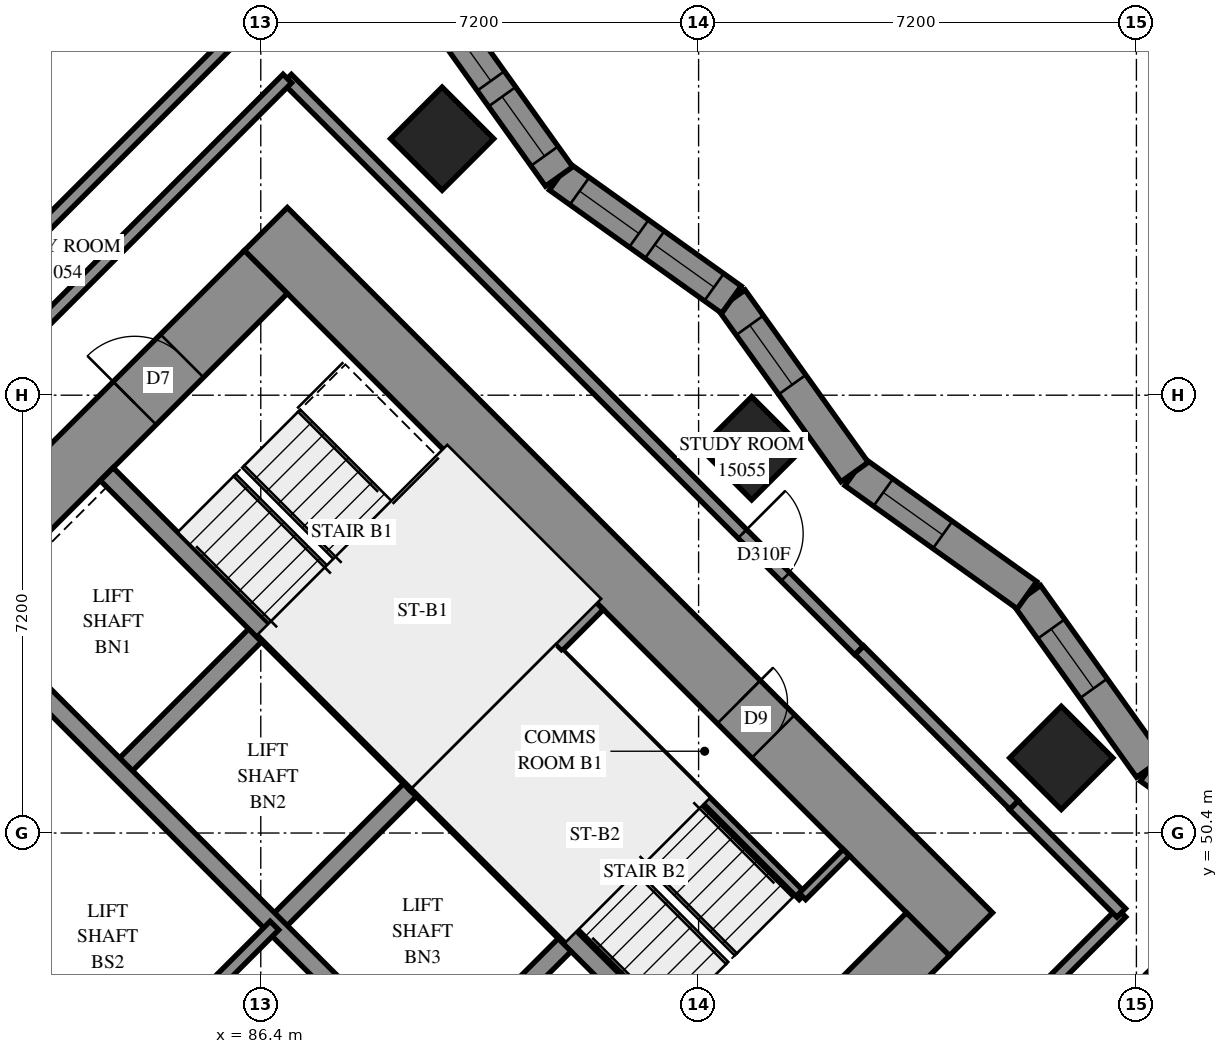
"""IFC4 building model, lengths in metres.
Left out: names, types, materials, properties, quantities, classifications, styles, units other than length and angle.
Written with IfcOpenShell. Run it as: python <this file> out.ifc"""

import sys

from ifc_helpers import new_model, si_unit, direction, frame, frame_2d, origin, origin_2d, place, context, subcontext, project, spatial, polyline, rectangle, outline, extrude, element, fill, save


model = new_model("IFC4")
c1 = context("Model", 3, precision=1e-05, world=origin(), true_north=direction((0.0, 1.0)))
c2 = subcontext(c1, "Body", "Model", "MODEL_VIEW")
j1 = project(units=[si_unit("LENGTHUNIT", "METRE"), si_unit("PLANEANGLEUNIT", "RADIAN")], contexts=[c1])
p1 = place(None, origin())
s1 = spatial("IfcSite", under=j1, at=p1, CompositionType="ELEMENT")
p2 = place(p1, origin())
s2 = spatial("IfcBuilding", under=s1, at=p2, CompositionType="ELEMENT")
p3 = place(p2, frame((0.0, 0.0, 57.6)))
s3 = spatial("IfcBuildingStorey", under=s2, at=p3, CompositionType="ELEMENT", Elevation=57.6)
for number, where, z_axis, x_axis in (
    (1, (89.382, 61.818, 0.0), (0.0, 0.0, 1.0), (0.707, -0.707, 0.0)),
    (2, (94.474, 56.727, 0.0), (0.0, 0.0, 1.0), (0.707, -0.707, 0.0)),
    (3, (99.565, 51.635, 0.0), (0.0, 0.0, 1.0), (0.707, -0.707, 0.0)),
):
    element("IfcColumn", number, at=place(p3, frame(where, z_axis=z_axis, x_axis=x_axis)), inside=s3, PredefinedType="COLUMN", context=c2, shape_type="SweptSolid", body=[
        extrude(rectangle(XDim=1.2, YDim=1.2, at=origin_2d()), origin(), (0.0, 0.0, 1.0), 3.1),
    ])
p4 = place(p3, frame((75.594, 49.443, -0.3), z_axis=(0.0, 0.0, 1.0), x_axis=(0.7071037324, -0.70710983, 0.0)))
e4 = element("IfcWall", 4, at=p4, inside=s3, PredefinedType="SHEAR", context=c2, shape_type="SweptSolid", body=[
    extrude(rectangle(XDim=16.4, YDim=1.0, at=frame_2d((8.2, 0.0))), origin(), (0.0, 0.0, 1.0), 2.7),
])
p5 = place(p3, frame((86.483, 60.333, -0.3), z_axis=(0.0, 0.0, 1.0), x_axis=(0.70710983, -0.7071037324, 0.0)))
e5 = element("IfcWall", 5, at=p5, inside=s3, PredefinedType="SHEAR", context=c2, shape_type="SweptSolid", body=[
    extrude(rectangle(XDim=16.4, YDim=1.0, at=frame_2d((8.2, 0.0))), origin(), (0.0, 0.0, 1.0), 2.7),
])
p6 = place(p5, frame((11.0, 0.0, 0.3)))
e6 = element("IfcOpeningElement", 6, at=p6, cuts=e5, PredefinedType="OPENING", context=c2, shape_type="SweptSolid", body=[
    extrude(rectangle(XDim=0.8, YDim=2.1, at=frame_2d((0.4, 1.05))), frame((0.0, 0.51, 0.0), z_axis=(0.0, -1.0, 0.0), x_axis=(1.0, 0.0, 0.0)), (0.0, 0.0, 1.0), 1.02),
])
p7 = place(p3, frame((76.301, 49.443, -0.3), z_axis=(0.0, 0.0, 1.0), x_axis=(0.7071067812, 0.7071067812, 0.0)))
e7 = element("IfcWall", 7, at=p7, inside=s3, PredefinedType="SHEAR", context=c2, shape_type="SweptSolid", body=[
    extrude(rectangle(XDim=14.4, YDim=1.0, at=frame_2d((7.2, 0.0))), origin(), (0.0, 0.0, 1.0), 2.7),
])
p8 = place(p7, frame((4.55, 0.0, 0.3)))
e8 = element("IfcOpeningElement", 8, at=p8, cuts=e7, PredefinedType="OPENING", context=c2, shape_type="SweptSolid", body=[
    extrude(rectangle(XDim=1.1, YDim=2.1, at=frame_2d((0.55, 1.05))), frame((0.0, 0.51, 0.0), z_axis=(0.0, -1.0, 0.0), x_axis=(1.0, 0.0, 0.0)), (0.0, 0.0, 1.0), 1.02),
])
p9 = place(p7, frame((11.35, 0.0, 0.3)))
e9 = element("IfcOpeningElement", 9, at=p9, cuts=e7, PredefinedType="OPENING", context=c2, shape_type="SweptSolid", body=[
    extrude(rectangle(XDim=1.1, YDim=2.1, at=frame_2d((0.55, 1.05))), frame((0.0, 0.51, 0.0), z_axis=(0.0, -1.0, 0.0), x_axis=(1.0, 0.0, 0.0)), (0.0, 0.0, 1.0), 1.02),
])
p10 = place(p3, frame((87.19, 38.554, -0.3), z_axis=(0.0, 0.0, 1.0), x_axis=(0.707103309, 0.7071102534, 0.0)))
e10 = element("IfcWall", 10, at=p10, inside=s3, PredefinedType="SHEAR", context=c2, shape_type="SweptSolid", body=[
    extrude(rectangle(XDim=14.4, YDim=1.0, at=frame_2d((7.2, 0.0))), origin(), (0.0, 0.0, 1.0), 2.7),
])
p11 = place(p10, frame((4.55, 0.0, 0.3)))
e11 = element("IfcOpeningElement", 11, at=p11, cuts=e10, PredefinedType="OPENING", context=c2, shape_type="SweptSolid", body=[
    extrude(rectangle(XDim=1.1, YDim=2.1, at=frame_2d((0.55, 1.05))), frame((0.0, 0.51, 0.0), z_axis=(0.0, -1.0, 0.0), x_axis=(1.0, 0.0, 0.0)), (0.0, 0.0, 1.0), 1.02),
])
p12 = place(p10, frame((11.35, 0.0, 0.3)))
e12 = element("IfcOpeningElement", 12, at=p12, cuts=e10, PredefinedType="OPENING", context=c2, shape_type="SweptSolid", body=[
    extrude(rectangle(XDim=1.1, YDim=2.1, at=frame_2d((0.55, 1.05))), frame((0.0, 0.51, 0.0), z_axis=(0.0, -1.0, 0.0), x_axis=(1.0, 0.0, 0.0)), (0.0, 0.0, 1.0), 1.02),
])
p13 = place(p3, frame((84.079, 51.423, 0.0), z_axis=(0.0, 0.0, 1.0), x_axis=(0.7071219326, 0.7070916295, 0.0)))
e13 = element("IfcWall", 13, at=p13, inside=s3, PredefinedType="SOLIDWALL", context=c2, shape_type="SweptSolid", body=[
    extrude(rectangle(XDim=3.3, YDim=0.3, at=frame_2d((1.65, 0.0))), origin(), (0.0, 0.0, 1.0), 3.1),
])
for number, where, z_axis, x_axis in (
    (14, (86.625, 48.878, 0.0), (0.0, 0.0, 1.0), (0.707, 0.707, 0.0)),
    (15, (89.17, 46.332, 0.0), (0.0, 0.0, 1.0), (0.707, 0.707, 0.0)),
):
    element("IfcWall", number, at=place(p3, frame(where, z_axis=z_axis, x_axis=x_axis)), inside=s3, PredefinedType="SOLIDWALL", context=c2, shape_type="SweptSolid", body=[
        extrude(rectangle(XDim=3.3, YDim=0.3, at=frame_2d((1.65, 0.0))), origin(), (0.0, 0.0, 1.0), 3.1),
    ])
p14 = place(p3, frame((78.988, 51.423, 0.0), z_axis=(0.0, 0.0, 1.0), x_axis=(0.7071067812, -0.7071067812, 0.0)))
e16 = element("IfcWall", 16, at=p14, inside=s3, PredefinedType="SOLIDWALL", context=c2, shape_type="SweptSolid", body=[
    extrude(rectangle(XDim=14.4, YDim=0.3, at=frame_2d((7.2, 0.0))), origin(), (0.0, 0.0, 1.0), 3.1),
])
p15 = place(p14, frame((1.25, 0.0, 0.0)))
e17 = element("IfcOpeningElement", 17, at=p15, cuts=e16, PredefinedType="OPENING", context=c2, shape_type="SweptSolid", body=[
    extrude(rectangle(XDim=1.1, YDim=2.1, at=frame_2d((0.55, 1.05))), frame((0.0, 0.16, 0.0), z_axis=(0.0, -1.0, 0.0), x_axis=(1.0, 0.0, 0.0)), (0.0, 0.0, 1.0), 0.32),
])
p16 = place(p14, frame((4.85, 0.0, 0.0)))
e18 = element("IfcOpeningElement", 18, at=p16, cuts=e16, PredefinedType="OPENING", context=c2, shape_type="SweptSolid", body=[
    extrude(rectangle(XDim=1.1, YDim=2.1, at=frame_2d((0.55, 1.05))), frame((0.0, 0.16, 0.0), z_axis=(0.0, -1.0, 0.0), x_axis=(1.0, 0.0, 0.0)), (0.0, 0.0, 1.0), 0.32),
])
p17 = place(p14, frame((8.45, 0.0, 0.0)))
e19 = element("IfcOpeningElement", 19, at=p17, cuts=e16, PredefinedType="OPENING", context=c2, shape_type="SweptSolid", body=[
    extrude(rectangle(XDim=1.1, YDim=2.1, at=frame_2d((0.55, 1.05))), frame((0.0, 0.16, 0.0), z_axis=(0.0, -1.0, 0.0), x_axis=(1.0, 0.0, 0.0)), (0.0, 0.0, 1.0), 0.32),
])
p18 = place(p14, frame((12.05, 0.0, 0.0)))
e20 = element("IfcOpeningElement", 20, at=p18, cuts=e16, PredefinedType="OPENING", context=c2, shape_type="SweptSolid", body=[
    extrude(rectangle(XDim=1.1, YDim=2.1, at=frame_2d((0.55, 1.05))), frame((0.0, 0.16, 0.0), z_axis=(0.0, -1.0, 0.0), x_axis=(1.0, 0.0, 0.0)), (0.0, 0.0, 1.0), 0.32),
])
p19 = place(p3, frame((81.534, 53.969, 0.0), z_axis=(0.0, 0.0, 1.0), x_axis=(0.707103309, -0.7071102534, 0.0)))
e21 = element("IfcWall", 21, at=p19, inside=s3, PredefinedType="SOLIDWALL", context=c2, shape_type="SweptSolid", body=[
    extrude(rectangle(XDim=14.4, YDim=0.3, at=frame_2d((7.2, 0.0))), origin(), (0.0, 0.0, 1.0), 3.1),
])
p20 = place(p19, frame((12.05, 0.0, 0.0)))
e22 = element("IfcOpeningElement", 22, at=p20, cuts=e21, PredefinedType="OPENING", context=c2, shape_type="SweptSolid", body=[
    extrude(rectangle(XDim=1.1, YDim=2.1, at=frame_2d((0.55, 1.05))), frame((0.0, 0.16, 0.0), z_axis=(0.0, -1.0, 0.0), x_axis=(1.0, 0.0, 0.0)), (0.0, 0.0, 1.0), 0.32),
])
for number, where, z_axis, x_axis in (
    (23, (83.867, 56.302, 0.0), (0.0, 0.0, 1.0), (0.707, -0.707, 0.0)),
    (24, (88.958, 51.211, 0.0), (0.0, 0.0, 1.0), (0.707, -0.707, 0.0)),
):
    element("IfcWall", number, at=place(p3, frame(where, z_axis=z_axis, x_axis=x_axis)), inside=s3, PredefinedType="SOLIDWALL", context=c2, shape_type="SweptSolid", body=[
        extrude(rectangle(XDim=7.2, YDim=0.3, at=frame_2d((3.6, 0.0))), origin(), (0.0, 0.0, 1.0), 3.1),
    ])
p21 = place(p3, frame((88.958, 51.211, 0.0), z_axis=(0.0, 0.0, 1.0), x_axis=(0.7071067812, 0.7071067812, 0.0)))
e25 = element("IfcWall", 25, at=p21, inside=s3, PredefinedType="SOLIDWALL", context=c2, shape_type="SweptSolid", body=[
    extrude(rectangle(XDim=4.2, YDim=0.3, at=frame_2d((2.1, 0.0))), origin(), (0.0, 0.0, 1.0), 3.1),
])
p22 = place(p3, frame((103.86, 49.452, 0.0), z_axis=(0.0, 0.0, 1.0), x_axis=(-0.8136209625, 0.5813956737, 0.0)))
e26 = element("IfcWall", 26, at=p22, inside=s3, PredefinedType="SOLIDWALL", context=c2, shape_type="SweptSolid", body=[
    extrude(outline(polyline([(-0.046, -0.275), (3.438, -0.275), (3.53, 0.275), (0.046, 0.275), (-0.046, -0.275)])), origin(), (0.0, 0.0, 1.0), 3.1),
])
p23 = place(p22, frame((1.539, 0.0, 0.5)))
e27 = element("IfcOpeningElement", 27, at=p23, cuts=e26, PredefinedType="OPENING", context=c2, shape_type="SweptSolid", body=[
    extrude(rectangle(XDim=1.2, YDim=2.45, at=frame_2d((0.6, 1.225))), frame((0.0, 0.285, 0.0), z_axis=(0.0, -1.0, 0.0), x_axis=(1.0, 0.0, 0.0)), (0.0, 0.0, 1.0), 0.57),
])
p24 = place(p3, frame((101.026, 51.477, 0.0), z_axis=(0.0, 0.0, 1.0), x_axis=(-0.5813956737, 0.8136209625, 0.0)))
e28 = element("IfcWall", 28, at=p24, inside=s3, PredefinedType="SOLIDWALL", context=c2, shape_type="SweptSolid", body=[
    extrude(outline(polyline([(0.046, -0.275), (3.53, -0.275), (3.438, 0.275), (-0.046, 0.275), (0.046, -0.275)])), origin(), (0.0, 0.0, 1.0), 3.1),
])
p25 = place(p24, frame((1.599, 0.0, 0.5)))
e29 = element("IfcOpeningElement", 29, at=p25, cuts=e28, PredefinedType="OPENING", context=c2, shape_type="SweptSolid", body=[
    extrude(rectangle(XDim=1.2, YDim=2.45, at=frame_2d((0.6, 1.225))), frame((0.0, 0.285, 0.0), z_axis=(0.0, -1.0, 0.0), x_axis=(1.0, 0.0, 0.0)), (0.0, 0.0, 1.0), 0.57),
])
p26 = place(p3, frame((99.0, 54.311, 0.0), z_axis=(0.0, 0.0, 1.0), x_axis=(-0.8136209625, 0.5813956737, 0.0)))
e30 = element("IfcWall", 30, at=p26, inside=s3, PredefinedType="SOLIDWALL", context=c2, shape_type="SweptSolid", body=[
    extrude(outline(polyline([(-0.046, -0.275), (3.438, -0.275), (3.53, 0.275), (0.046, 0.275), (-0.046, -0.275)])), origin(), (0.0, 0.0, 1.0), 3.1),
])
p27 = place(p26, frame((1.705, 0.0, 0.5)))
e31 = element("IfcOpeningElement", 31, at=p27, cuts=e30, PredefinedType="OPENING", context=c2, shape_type="SweptSolid", body=[
    extrude(rectangle(XDim=1.2, YDim=2.45, at=frame_2d((0.6, 1.225))), frame((0.0, 0.285, 0.0), z_axis=(0.0, -1.0, 0.0), x_axis=(1.0, 0.0, 0.0)), (0.0, 0.0, 1.0), 0.57),
])
p28 = place(p3, frame((96.166, 56.337, 0.0), z_axis=(0.0, 0.0, 1.0), x_axis=(-0.5813956737, 0.8136209625, 0.0)))
e32 = element("IfcWall", 32, at=p28, inside=s3, PredefinedType="SOLIDWALL", context=c2, shape_type="SweptSolid", body=[
    extrude(outline(polyline([(0.046, -0.275), (3.53, -0.275), (3.438, 0.275), (-0.046, 0.275), (0.046, -0.275)])), origin(), (0.0, 0.0, 1.0), 3.1),
])
p29 = place(p28, frame((1.765, 0.0, 0.5)))
e33 = element("IfcOpeningElement", 33, at=p29, cuts=e32, PredefinedType="OPENING", context=c2, shape_type="SweptSolid", body=[
    extrude(rectangle(XDim=1.2, YDim=2.45, at=frame_2d((0.6, 1.225))), frame((0.0, 0.285, 0.0), z_axis=(0.0, -1.0, 0.0), x_axis=(1.0, 0.0, 0.0)), (0.0, 0.0, 1.0), 0.57),
])
p30 = place(p3, frame((94.141, 59.171, 0.0), z_axis=(0.0, 0.0, 1.0), x_axis=(-0.8136209625, 0.5813956737, 0.0)))
e34 = element("IfcWall", 34, at=p30, inside=s3, PredefinedType="SOLIDWALL", context=c2, shape_type="SweptSolid", body=[
    extrude(outline(polyline([(-0.046, -0.275), (3.438, -0.275), (3.53, 0.275), (0.046, 0.275), (-0.046, -0.275)])), origin(), (0.0, 0.0, 1.0), 3.1),
])
p31 = place(p30, frame((0.352, 0.0, 0.5)))
e35 = element("IfcOpeningElement", 35, at=p31, cuts=e34, PredefinedType="OPENING", context=c2, shape_type="SweptSolid", body=[
    extrude(rectangle(XDim=1.2, YDim=2.45, at=frame_2d((0.6, 1.225))), frame((0.0, 0.285, 0.0), z_axis=(0.0, -1.0, 0.0), x_axis=(1.0, 0.0, 0.0)), (0.0, 0.0, 1.0), 0.57),
])
p32 = place(p30, frame((1.871, 0.0, 0.5)))
e36 = element("IfcOpeningElement", 36, at=p32, cuts=e34, PredefinedType="OPENING", context=c2, shape_type="SweptSolid", body=[
    extrude(rectangle(XDim=1.2, YDim=2.45, at=frame_2d((0.6, 1.225))), frame((0.0, 0.285, 0.0), z_axis=(0.0, -1.0, 0.0), x_axis=(1.0, 0.0, 0.0)), (0.0, 0.0, 1.0), 0.57),
])
p33 = place(p3, frame((91.306, 61.197, 0.0), z_axis=(0.0, 0.0, 1.0), x_axis=(-0.5813956737, 0.8136209625, 0.0)))
e37 = element("IfcWall", 37, at=p33, inside=s3, PredefinedType="SOLIDWALL", context=c2, shape_type="SweptSolid", body=[
    extrude(outline(polyline([(0.046, -0.275), (3.53, -0.275), (3.438, 0.275), (-0.046, 0.275), (0.046, -0.275)])), origin(), (0.0, 0.0, 1.0), 3.1),
])
p34 = place(p33, frame((0.412, 0.0, 0.5)))
e38 = element("IfcOpeningElement", 38, at=p34, cuts=e37, PredefinedType="OPENING", context=c2, shape_type="SweptSolid", body=[
    extrude(rectangle(XDim=1.2, YDim=2.45, at=frame_2d((0.6, 1.225))), frame((0.0, 0.285, 0.0), z_axis=(0.0, -1.0, 0.0), x_axis=(1.0, 0.0, 0.0)), (0.0, 0.0, 1.0), 0.57),
])
p35 = place(p33, frame((1.931, 0.0, 0.5)))
e39 = element("IfcOpeningElement", 39, at=p35, cuts=e37, PredefinedType="OPENING", context=c2, shape_type="SweptSolid", body=[
    extrude(rectangle(XDim=1.2, YDim=2.45, at=frame_2d((0.6, 1.225))), frame((0.0, 0.285, 0.0), z_axis=(0.0, -1.0, 0.0), x_axis=(1.0, 0.0, 0.0)), (0.0, 0.0, 1.0), 0.57),
])
p36 = place(p3, frame((91.313, 53.354, 0.0), z_axis=(0.0, 0.0, 1.0), x_axis=(0.7071067812, -0.7071067812, 0.0)))
e40 = element("IfcWall", 40, at=p36, inside=s3, PredefinedType="PARTITIONING", context=c2, shape_type="SweptSolid", body=[
    extrude(rectangle(XDim=5.65, YDim=0.15, at=frame_2d((2.825, 0.0))), origin(), (0.0, 0.0, 1.0), 3.1),
])
p37 = place(p3, frame((95.308, 49.358, 0.0), z_axis=(0.0, 0.0, 1.0), x_axis=(0.70705776, 0.707155799, 0.0)))
e41 = element("IfcWall", 41, at=p37, inside=s3, PredefinedType="PARTITIONING", context=c2, shape_type="SweptSolid", body=[
    extrude(rectangle(XDim=1.02, YDim=0.15, at=frame_2d((0.51, 0.0))), origin(), (0.0, 0.0, 1.0), 3.1),
])
p38 = place(p3, frame((84.079, 46.332, 0.0), z_axis=(0.0, 0.0, 1.0), x_axis=(0.7071067812, 0.7071067812, 0.0)))
e42 = element("IfcWall", 42, at=p38, inside=s3, PredefinedType="PARTITIONING", context=c2, shape_type="SweptSolid", body=[
    extrude(rectangle(XDim=3.6, YDim=0.2, at=frame_2d((1.8, 0.0))), origin(), (0.0, 0.0, 1.0), 3.1),
])
p39 = place(p3, frame((86.833, 62.805, 0.0), z_axis=(0.0, 0.0, 1.0), x_axis=(0.7072045138, -0.7070090351, 0.0)))
e43 = element("IfcWall", 43, at=p39, inside=s3, PredefinedType="PARTITIONING", context=c2, shape_type="SweptSolid", body=[
    extrude(rectangle(XDim=13.301, YDim=0.2, at=frame_2d((6.65, 0.0))), origin(), (0.0, 0.0, 1.0), 3.1),
])
p40 = place(p39, frame((10.586, 0.0, 0.0)))
e44 = element("IfcOpeningElement", 44, at=p40, cuts=e43, PredefinedType="OPENING", context=c2, shape_type="SweptSolid", body=[
    extrude(rectangle(XDim=1.0, YDim=2.1, at=frame_2d((0.5, 1.05))), frame((0.0, 0.11, 0.0), z_axis=(0.0, -1.0, 0.0), x_axis=(1.0, 0.0, 0.0)), (0.0, 0.0, 1.0), 0.22),
])
p41 = place(p3, frame((94.259, 41.243, 0.0), z_axis=(0.0, 0.0, 1.0), x_axis=(0.7070203602, 0.7071931916, 0.0)))
e45 = element("IfcWall", 45, at=p41, inside=s3, PredefinedType="PARTITIONING", context=c2, shape_type="SweptSolid", body=[
    extrude(rectangle(XDim=12.151, YDim=0.2, at=frame_2d((6.075, 0.0))), origin(), (0.0, 0.0, 1.0), 3.1),
])
p42 = place(p3, frame((93.484, 42.02, 0.0), z_axis=(0.0, 0.0, 1.0), x_axis=(0.7071067812, 0.7071067812, 0.0)))
e46 = element("IfcWall", 46, at=p42, inside=s3, PredefinedType="PARTITIONING", context=c2, shape_type="SweptSolid", body=[
    extrude(rectangle(XDim=9.998, YDim=0.2, at=frame_2d((4.999, 0.0))), origin(), (0.0, 0.0, 1.0), 3.1),
])
p43 = place(p42, frame((0.148, 0.0, 0.0)))
e47 = element("IfcOpeningElement", 47, at=p43, cuts=e46, PredefinedType="OPENING", context=c2, shape_type="SweptSolid", body=[
    extrude(rectangle(XDim=1.0, YDim=2.1, at=frame_2d((0.5, 1.05))), frame((0.0, 0.11, 0.0), z_axis=(0.0, -1.0, 0.0), x_axis=(1.0, 0.0, 0.0)), (0.0, 0.0, 1.0), 0.22),
])
p44 = place(p3, frame((81.049, 58.577, 0.0), z_axis=(0.0, 0.0, 1.0), x_axis=(0.7071122929, 0.7071012694, 0.0)))
e48 = element("IfcWall", 48, at=p44, inside=s3, PredefinedType="PARTITIONING", context=c2, shape_type="SweptSolid", body=[
    extrude(rectangle(XDim=9.072, YDim=0.2, at=frame_2d((4.536, 0.0))), origin(), (0.0, 0.0, 1.0), 3.1),
])
p45 = place(p3, frame((81.053, 57.021, 0.0), z_axis=(0.0, 0.0, 1.0), x_axis=(0.7069845395, 0.7072290017, 0.0)))
e49 = element("IfcWall", 49, at=p45, inside=s3, PredefinedType="PARTITIONING", context=c2, shape_type="SweptSolid", body=[
    extrude(rectangle(XDim=8.181, YDim=0.2, at=frame_2d((4.091, 0.0))), origin(), (0.0, 0.0, 1.0), 3.1),
])
p46 = place(p45, frame((0.86, 0.0, 0.0)))
e50 = element("IfcOpeningElement", 50, at=p46, cuts=e49, PredefinedType="OPENING", context=c2, shape_type="SweptSolid", body=[
    extrude(rectangle(XDim=1.0, YDim=2.1, at=frame_2d((0.5, 1.05))), frame((0.0, 0.11, 0.0), z_axis=(0.0, -1.0, 0.0), x_axis=(1.0, 0.0, 0.0)), (0.0, 0.0, 1.0), 0.22),
])
p47 = place(p3, frame((96.244, 53.406, 0.0), z_axis=(0.0, 0.0, 1.0), x_axis=(0.7068288851, -0.7073845681, 0.0)))
e51 = element("IfcWall", 51, at=p47, inside=s3, PredefinedType="PARTITIONING", context=c2, shape_type="SweptSolid", body=[
    extrude(rectangle(XDim=3.599, YDim=0.2, at=frame_2d((1.8, 0.0))), origin(), (0.0, 0.0, 1.0), 3.1),
])
p48 = place(p3, frame((98.783, 50.855, 0.0), z_axis=(0.0, 0.0, 1.0), x_axis=(0.7071067812, -0.7071067812, 0.0)))
e52 = element("IfcWall", 52, at=p48, inside=s3, PredefinedType="PARTITIONING", context=c2, shape_type="SweptSolid", body=[
    extrude(rectangle(XDim=2.5, YDim=0.2, at=frame_2d((1.25, 0.0))), origin(), (0.0, 0.0, 1.0), 3.1),
])
p49 = place(p25, origin())
e53 = element("IfcWindow", 53, at=p49, inside=s3, PartitioningType="SINGLE_PANEL", PredefinedType="WINDOW", context=c2, shape_type="SweptSolid", body=[
    extrude(rectangle(XDim=1.2, YDim=2.45, at=frame_2d((0.6, 1.225))), frame((0.0, 0.155, 0.0), z_axis=(0.0, -1.0, 0.0), x_axis=(1.0, 0.0, 0.0)), (0.0, 0.0, 1.0), 0.06),
])
fill(e29, e53)
p50 = place(p27, origin())
e54 = element("IfcWindow", 54, at=p50, inside=s3, PartitioningType="SINGLE_PANEL", PredefinedType="WINDOW", context=c2, shape_type="SweptSolid", body=[
    extrude(rectangle(XDim=1.2, YDim=2.45, at=frame_2d((0.6, 1.225))), frame((0.0, 0.155, 0.0), z_axis=(0.0, -1.0, 0.0), x_axis=(1.0, 0.0, 0.0)), (0.0, 0.0, 1.0), 0.06),
])
fill(e31, e54)
p51 = place(p29, origin())
e55 = element("IfcWindow", 55, at=p51, inside=s3, PartitioningType="SINGLE_PANEL", PredefinedType="WINDOW", context=c2, shape_type="SweptSolid", body=[
    extrude(rectangle(XDim=1.2, YDim=2.45, at=frame_2d((0.6, 1.225))), frame((0.0, 0.155, 0.0), z_axis=(0.0, -1.0, 0.0), x_axis=(1.0, 0.0, 0.0)), (0.0, 0.0, 1.0), 0.06),
])
fill(e33, e55)
p52 = place(p31, origin())
e56 = element("IfcWindow", 56, at=p52, inside=s3, PartitioningType="SINGLE_PANEL", PredefinedType="WINDOW", context=c2, shape_type="SweptSolid", body=[
    extrude(rectangle(XDim=1.2, YDim=2.45, at=frame_2d((0.6, 1.225))), frame((0.0, 0.155, 0.0), z_axis=(0.0, -1.0, 0.0), x_axis=(1.0, 0.0, 0.0)), (0.0, 0.0, 1.0), 0.06),
])
fill(e35, e56)
p53 = place(p32, origin())
e57 = element("IfcWindow", 57, at=p53, inside=s3, PartitioningType="SINGLE_PANEL", PredefinedType="WINDOW", context=c2, shape_type="SweptSolid", body=[
    extrude(rectangle(XDim=1.2, YDim=2.45, at=frame_2d((0.6, 1.225))), frame((0.0, 0.155, 0.0), z_axis=(0.0, -1.0, 0.0), x_axis=(1.0, 0.0, 0.0)), (0.0, 0.0, 1.0), 0.06),
])
fill(e36, e57)
p54 = place(p34, origin())
e58 = element("IfcWindow", 58, at=p54, inside=s3, PartitioningType="SINGLE_PANEL", PredefinedType="WINDOW", context=c2, shape_type="SweptSolid", body=[
    extrude(rectangle(XDim=1.2, YDim=2.45, at=frame_2d((0.6, 1.225))), frame((0.0, 0.155, 0.0), z_axis=(0.0, -1.0, 0.0), x_axis=(1.0, 0.0, 0.0)), (0.0, 0.0, 1.0), 0.06),
])
fill(e38, e58)
p55 = place(p35, origin())
e59 = element("IfcWindow", 59, at=p55, inside=s3, PartitioningType="SINGLE_PANEL", PredefinedType="WINDOW", context=c2, shape_type="SweptSolid", body=[
    extrude(rectangle(XDim=1.2, YDim=2.45, at=frame_2d((0.6, 1.225))), frame((0.0, 0.155, 0.0), z_axis=(0.0, -1.0, 0.0), x_axis=(1.0, 0.0, 0.0)), (0.0, 0.0, 1.0), 0.06),
])
fill(e39, e59)
p56 = place(p6, origin())
e60 = element("IfcDoor", 60, at=p56, inside=s3, OperationType="SINGLE_SWING_RIGHT", PredefinedType="DOOR", context=c2, shape_type="SweptSolid", body=[
    extrude(rectangle(XDim=0.8, YDim=2.1, at=frame_2d((0.4, 1.05))), frame((0.0, -0.44, 0.0), z_axis=(0.0, -1.0, 0.0), x_axis=(1.0, 0.0, 0.0)), (0.0, 0.0, 1.0), 0.05),
])
fill(e6, e60)
p57 = place(p9, origin())
e61 = element("IfcDoor", 61, at=p57, inside=s3, OperationType="SINGLE_SWING_LEFT", PredefinedType="DOOR", context=c2, shape_type="SweptSolid", body=[
    extrude(rectangle(XDim=1.1, YDim=2.1, at=frame_2d((0.55, 1.05))), frame((0.0, 0.025, 0.0), z_axis=(0.0, -1.0, 0.0), x_axis=(1.0, 0.0, 0.0)), (0.0, 0.0, 1.0), 0.05),
])
fill(e9, e61)
p58 = place(p40, origin())
e62 = element("IfcDoor", 62, at=p58, inside=s3, OperationType="SINGLE_SWING_LEFT", PredefinedType="DOOR", context=c2, shape_type="SweptSolid", body=[
    extrude(rectangle(XDim=1.0, YDim=2.1, at=frame_2d((0.5, 1.05))), frame((0.0, 0.025, 0.0), z_axis=(0.0, -1.0, 0.0), x_axis=(1.0, 0.0, 0.0)), (0.0, 0.0, 1.0), 0.05),
])
fill(e44, e62)
save(model, sys.argv[1])
